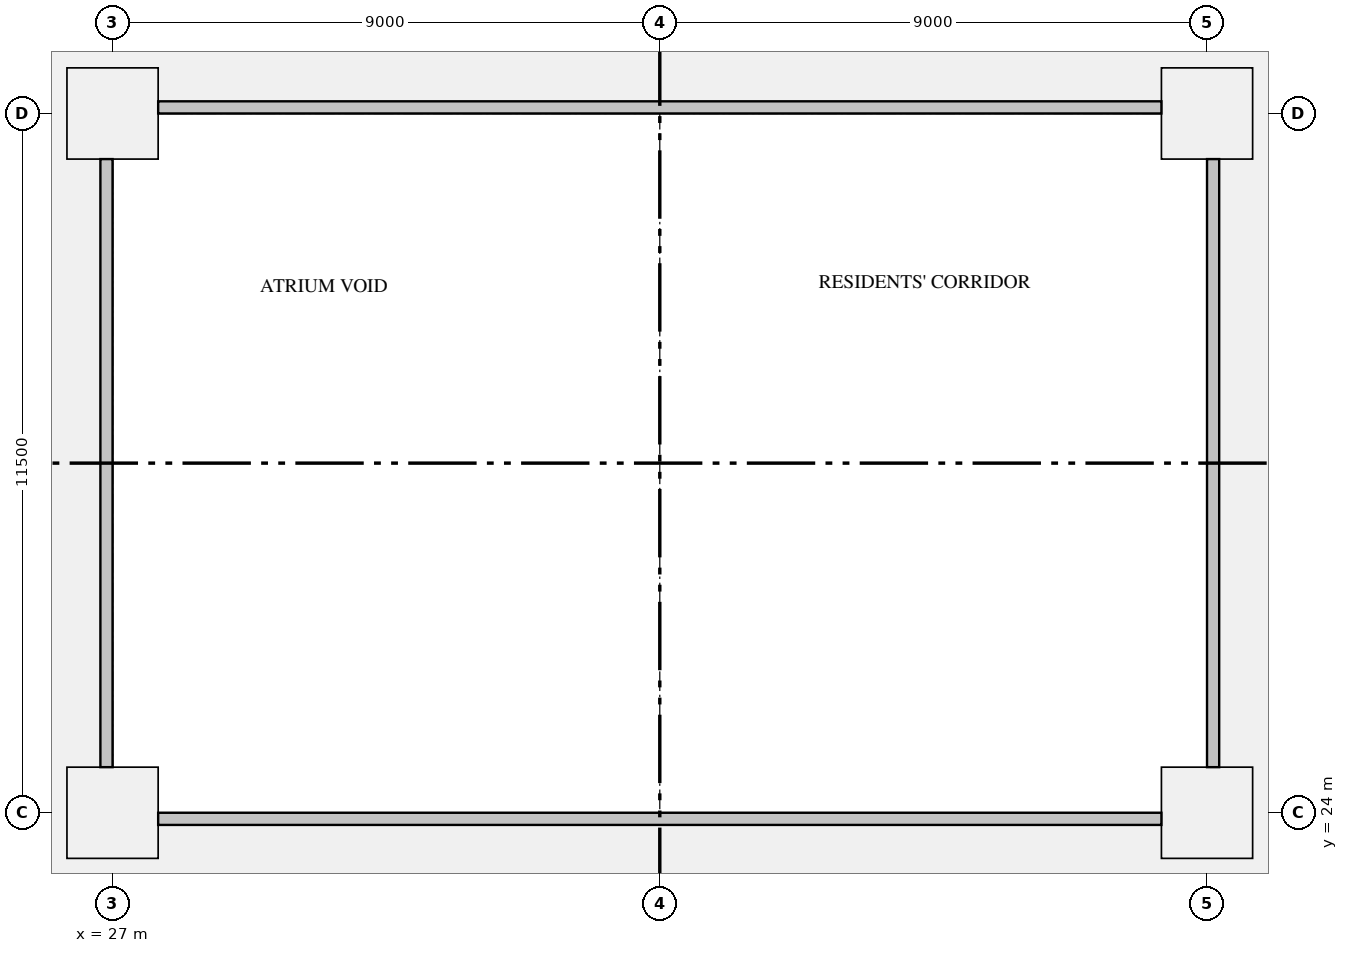
"""IFC4 building model, lengths in metres.
Left out: names, types, materials, properties, quantities, classifications, styles, units other than length and angle.
Written with IfcOpenShell. Run it as: python <this file> out.ifc"""

import sys

from ifc_helpers import new_model, si_unit, direction, frame, origin, origin_2d, place, context, subcontext, project, spatial, rectangle, extrude, element, save


model = new_model("IFC4")
c1 = context("Model", 3, precision=1e-05, world=origin(), true_north=direction((0.0, 1.0)))
c2 = subcontext(c1, "Body", "Model", "MODEL_VIEW")
j1 = project(units=[si_unit("LENGTHUNIT", "METRE"), si_unit("PLANEANGLEUNIT", "RADIAN")], contexts=[c1])
p1 = place(None, origin())
s1 = spatial("IfcSite", under=j1, at=p1, CompositionType="ELEMENT")
p2 = place(p1, origin())
s2 = spatial("IfcBuilding", under=s1, at=p2, CompositionType="ELEMENT")
p3 = place(p2, frame((0.0, 0.0, 28.95)))
s3 = spatial("IfcBuildingStorey", under=s2, at=p3, CompositionType="ELEMENT", Elevation=28.95)
for number, where, z_axis, x_axis in (
    (1, (27.0, 24.0, 0.0), (0.0, 0.0, 1.0), (1.0, 0.0, 0.0)),
    (2, (45.0, 24.0, 0.0), (0.0, 0.0, 1.0), (1.0, 0.0, 0.0)),
    (3, (27.0, 35.5, 0.0), (0.0, 0.0, 1.0), (1.0, 0.0, 0.0)),
    (4, (45.0, 35.5, 0.0), (0.0, 0.0, 1.0), (1.0, 0.0, 0.0)),
):
    element("IfcColumn", number, at=place(p3, frame(where, z_axis=z_axis, x_axis=x_axis)), inside=s3, PredefinedType="COLUMN", context=c2, shape_type="SweptSolid", body=[
        extrude(rectangle(XDim=1.5, YDim=1.5, at=origin_2d()), origin(), (0.0, 0.0, 1.0), 3.15),
    ])
save(model, sys.argv[1])
